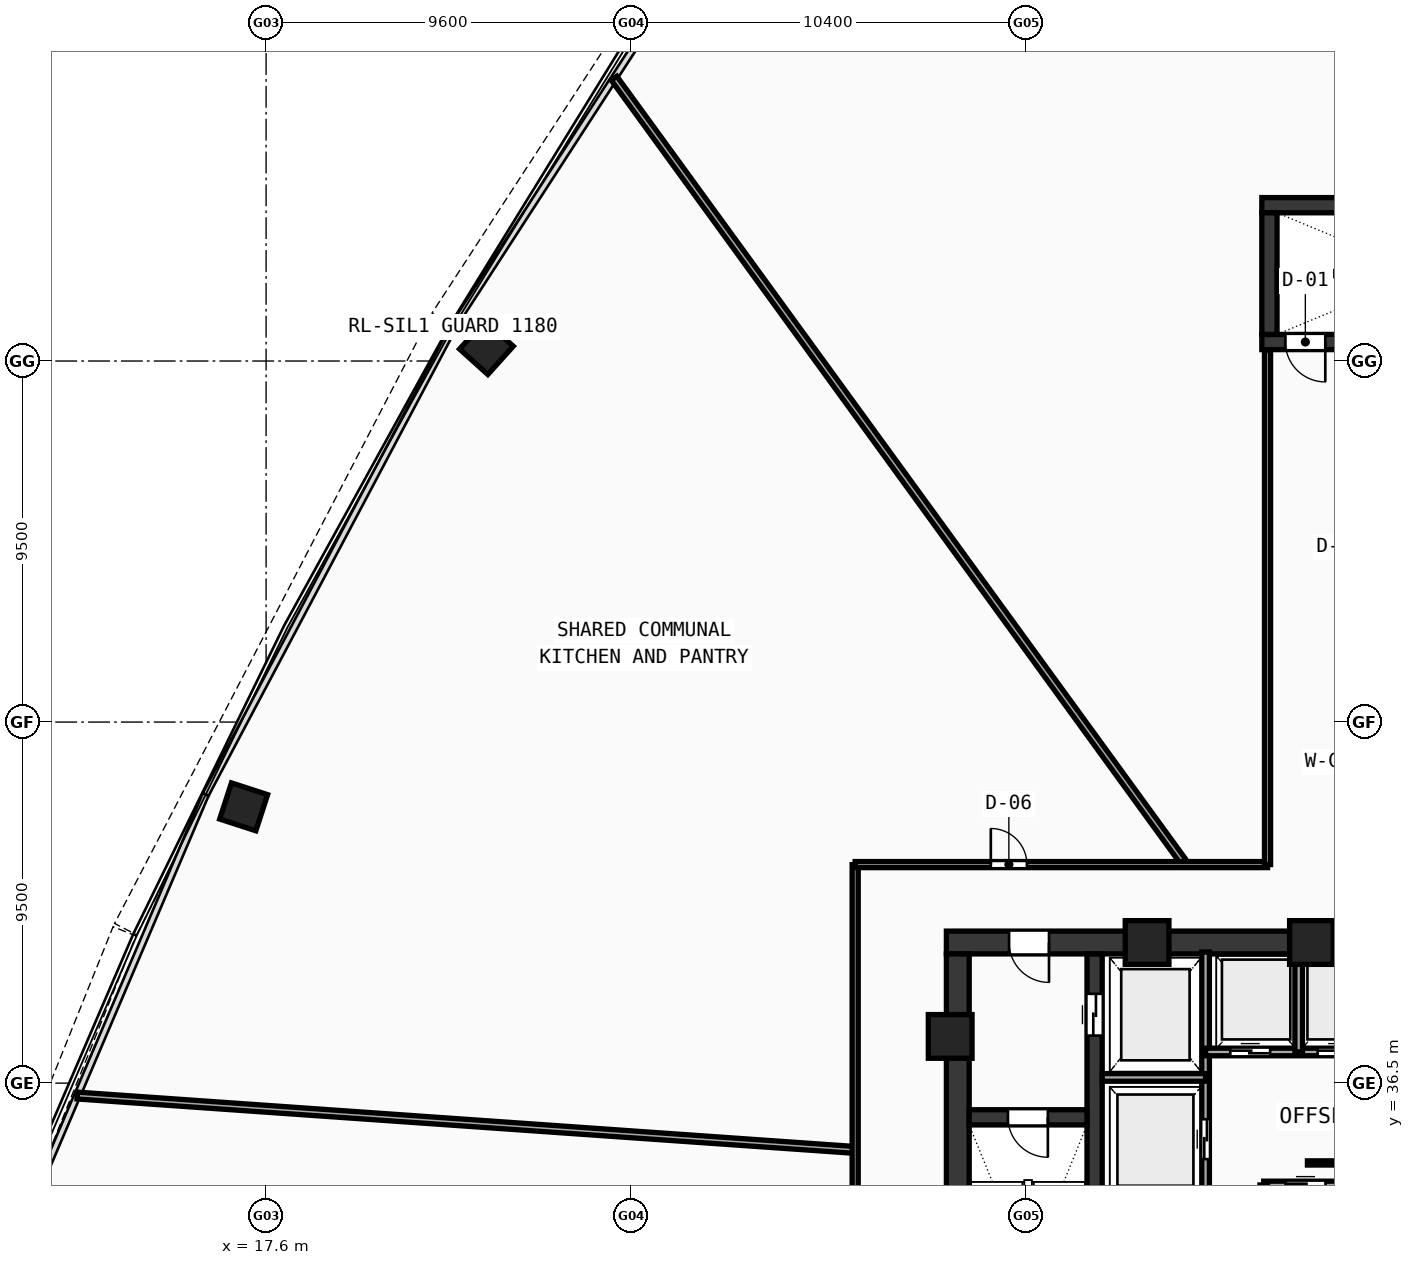
"""IFC4 building model, lengths in metres.
Left out: names, types, materials, properties, quantities, classifications, styles, units other than length and angle.
Written with IfcOpenShell. Run it as: python <this file> out.ifc"""

import sys

from ifc_helpers import new_model, si_unit, direction, frame, frame_2d, origin, origin_with_axes, origin_2d, place, context, subcontext, project, spatial, rectangle, hollow_rectangle, extrude, source, transform, mapped, element, fill, save


model = new_model("IFC4")
c1 = context("Model", 3, precision=1e-05, world=origin(), true_north=direction((0.0, 1.0)))
c2 = subcontext(c1, "Body", "Model", "MODEL_VIEW")
j1 = project(units=[si_unit("LENGTHUNIT", "METRE"), si_unit("PLANEANGLEUNIT", "RADIAN")], contexts=[c1])
p1 = place(None, origin())
s1 = spatial("IfcSite", under=j1, at=p1, CompositionType="ELEMENT")
p2 = place(p1, origin())
s2 = spatial("IfcBuilding", under=s1, at=p2, CompositionType="ELEMENT")
p3 = place(p2, frame((0.0, 0.0, 119.18)))
s3 = spatial("IfcBuildingStorey", under=s2, at=p3, CompositionType="ELEMENT", Elevation=119.18)
p4 = place(p3, frame((35.5, 40.2, 0.0), z_axis=(0.0, 0.0, 1.0), x_axis=(1.0, 0.0, 0.0)))
e1 = element("IfcWall", 1, at=p4, inside=s3, PredefinedType="SHEAR", context=c2, shape_type="SweptSolid", body=[
    extrude(rectangle(XDim=11.3, YDim=0.6, at=frame_2d((5.65, 0.0))), origin(), (0.0, 0.0, 1.0), 5.57),
])
p5 = place(p4, frame((1.65, 0.0, 0.0)))
e2 = element("IfcOpeningElement", 2, at=p5, cuts=e1, PredefinedType="OPENING", context=c2, shape_type="SweptSolid", body=[
    extrude(rectangle(XDim=1.05, YDim=2.1, at=frame_2d((0.525, 1.05))), frame((0.0, 0.31, 0.0), z_axis=(0.0, -1.0, 0.0), x_axis=(1.0, 0.0, 0.0)), (0.0, 0.0, 1.0), 0.62),
])
p6 = place(p3, frame((35.8, 27.8, 0.0), z_axis=(0.0, 0.0, 1.0), x_axis=(0.0, 1.0, 0.0)))
e3 = element("IfcWall", 3, at=p6, inside=s3, PredefinedType="SHEAR", context=c2, shape_type="SweptSolid", body=[
    extrude(rectangle(XDim=12.1, YDim=0.6, at=frame_2d((6.05, 0.0))), origin(), (0.0, 0.0, 1.0), 5.57),
])
p7 = place(p3, frame((39.4, 27.8, 0.0), z_axis=(0.0, 0.0, 1.0), x_axis=(0.0, 1.0, 0.0)))
e4 = element("IfcWall", 4, at=p7, inside=s3, PredefinedType="SHEAR", context=c2, shape_type="SweptSolid", body=[
    extrude(rectangle(XDim=12.1, YDim=0.4, at=frame_2d((6.05, 0.0))), origin(), (0.0, 0.0, 1.0), 5.57),
])
p8 = place(p7, frame((9.95, 0.0, 0.0)))
e5 = element("IfcOpeningElement", 5, at=p8, cuts=e4, PredefinedType="OPENING", context=c2, shape_type="SweptSolid", body=[
    extrude(rectangle(XDim=1.1, YDim=2.1, at=frame_2d((0.55, 1.05))), frame((0.0, 0.21, 0.0), z_axis=(0.0, -1.0, 0.0), x_axis=(1.0, 0.0, 0.0)), (0.0, 0.0, 1.0), 0.42),
])
p9 = place(p3, frame((36.1, 35.6, 0.0), z_axis=(0.0, 0.0, 1.0), x_axis=(1.0, 0.0, 0.0)))
e6 = element("IfcWall", 6, at=p9, inside=s3, PredefinedType="SHEAR", context=c2, shape_type="SweptSolid", body=[
    extrude(rectangle(XDim=3.1, YDim=0.4, at=frame_2d((1.55, 0.0))), origin(), (0.0, 0.0, 1.0), 5.57),
])
p10 = place(p9, frame((1.02, 0.0, 0.0)))
e7 = element("IfcOpeningElement", 7, at=p10, cuts=e6, PredefinedType="OPENING", context=c2, shape_type="SweptSolid", body=[
    extrude(rectangle(XDim=1.05, YDim=2.1, at=frame_2d((0.525, 1.05))), frame((0.0, 0.21, 0.0), z_axis=(0.0, -1.0, 0.0), x_axis=(1.0, 0.0, 0.0)), (0.0, 0.0, 1.0), 0.42),
])
p11 = place(p3, frame((43.8, 59.6, 0.0), z_axis=(0.0, 0.0, 1.0), x_axis=(1.0, 0.0, 0.0)))
e8 = element("IfcWall", 8, at=p11, inside=s3, PredefinedType="SHEAR", context=c2, shape_type="SweptSolid", body=[
    extrude(rectangle(XDim=8.5, YDim=0.4, at=frame_2d((4.25, 0.0))), origin(), (0.0, 0.0, 1.0), 5.57),
])
p12 = place(p3, frame((43.8, 56.0, 0.0), z_axis=(0.0, 0.0, 1.0), x_axis=(1.0, 0.0, 0.0)))
e9 = element("IfcWall", 9, at=p12, inside=s3, PredefinedType="SHEAR", context=c2, shape_type="SweptSolid", body=[
    extrude(rectangle(XDim=8.5, YDim=0.4, at=frame_2d((4.25, 0.0))), origin(), (0.0, 0.0, 1.0), 5.57),
])
p13 = place(p12, frame((0.62, 0.0, 0.0)))
e10 = element("IfcOpeningElement", 10, at=p13, cuts=e9, PredefinedType="OPENING", context=c2, shape_type="SweptSolid", body=[
    extrude(rectangle(XDim=1.05, YDim=2.1, at=frame_2d((0.525, 1.05))), frame((0.0, 0.21, 0.0), z_axis=(0.0, -1.0, 0.0), x_axis=(1.0, 0.0, 0.0)), (0.0, 0.0, 1.0), 0.42),
])
p14 = place(p3, frame((44.0, 56.2, 0.0), z_axis=(0.0, 0.0, 1.0), x_axis=(0.0, 1.0, 0.0)))
e11 = element("IfcWall", 11, at=p14, inside=s3, PredefinedType="SHEAR", context=c2, shape_type="SweptSolid", body=[
    extrude(rectangle(XDim=3.2, YDim=0.4, at=frame_2d((1.6, 0.0))), origin(), (0.0, 0.0, 1.0), 5.57),
])
m1 = source(origin(), c2, "Body", "SweptSolid", [
    extrude(hollow_rectangle(XDim=1.15, YDim=1.15, WallThickness=0.048, at=origin_2d()), origin(), (0.0, 0.0, 1.0), 5.85),
])
for number, where, z_axis, x_axis in (
    (12, (45.106, 40.2, -0.28), (0.0, 0.0, 1.0), (1.0, 0.0, 0.0)),
    (13, (40.781, 40.2, -0.28), (0.0, 0.0, 1.0), (1.0, 0.0, 0.0)),
    (14, (35.6, 37.729, -0.28), (0.0, 0.0, 1.0), (1.0, 0.0, 0.0)),
):
    element("IfcColumn", number, at=place(p3, frame(where, z_axis=z_axis, x_axis=x_axis)), inside=s3, PredefinedType="COLUMN", context=c2, shape_type="MappedRepresentation", body=[
        mapped(m1, transform((0.0, 0.0, 0.0), scale=1.0)),
    ])
m2 = source(origin(), c2, "Body", "SweptSolid", [
    extrude(hollow_rectangle(XDim=1.0, YDim=1.0, WallThickness=0.042, at=origin_2d()), origin(), (0.0, 0.0, 1.0), 5.85),
])
for number, where, z_axis, x_axis in (
    (15, (23.397, 55.852, -0.28), (0.0, 0.0, 1.0), (-0.669, -0.743, 0.0)),
    (16, (17.009, 43.77, -0.28), (0.0, 0.0, 1.0), (-0.309, -0.951, 0.0)),
):
    element("IfcColumn", number, at=place(p3, frame(where, z_axis=z_axis, x_axis=x_axis)), inside=s3, PredefinedType="COLUMN", context=c2, shape_type="MappedRepresentation", body=[
        mapped(m2, transform((0.0, 0.0, 0.0), scale=1.0)),
    ])
p15 = place(p3, frame((42.32, 33.5, 0.0), z_axis=(0.0, 0.0, 1.0), x_axis=(0.0, 1.0, 0.0)))
e17 = element("IfcWall", 17, at=p15, inside=s3, PredefinedType="SOLIDWALL", context=c2, shape_type="SweptSolid", body=[
    extrude(rectangle(XDim=6.45, YDim=0.2, at=frame_2d((3.225, 0.0))), origin(), (0.0, 0.0, 1.0), 5.57),
])
p16 = place(p15, frame((1.0, 0.0, 0.0)))
e18 = element("IfcOpeningElement", 18, at=p16, cuts=e17, PredefinedType="OPENING", context=c2, shape_type="SweptSolid", body=[
    extrude(rectangle(XDim=1.05, YDim=2.1, at=frame_2d((0.525, 1.05))), frame((0.0, 0.11, 0.0), z_axis=(0.0, -1.0, 0.0), x_axis=(1.0, 0.0, 0.0)), (0.0, 0.0, 1.0), 0.22),
])
p17 = place(p3, frame((39.6, 36.65, 0.0), z_axis=(0.0, 0.0, 1.0), x_axis=(1.0, 0.0, 0.0)))
e19 = element("IfcWall", 19, at=p17, inside=s3, PredefinedType="SOLIDWALL", context=c2, shape_type="SweptSolid", body=[
    extrude(rectangle(XDim=2.72, YDim=0.2, at=frame_2d((1.36, 0.0))), origin(), (0.0, 0.0, 1.0), 5.57),
])
p18 = place(p3, frame((42.32, 37.32, 0.0), z_axis=(0.0, 0.0, 1.0), x_axis=(1.0, 0.0, 0.0)))
e20 = element("IfcWall", 20, at=p18, inside=s3, PredefinedType="SOLIDWALL", context=c2, shape_type="SweptSolid", body=[
    extrude(rectangle(XDim=4.73, YDim=0.2, at=frame_2d((2.365, 0.0))), origin(), (0.0, 0.0, 1.0), 5.57),
])
p19 = place(p18, frame((0.65, 0.0, 0.0)))
e21 = element("IfcOpeningElement", 21, at=p19, cuts=e20, PredefinedType="OPENING", context=c2, shape_type="SweptSolid", body=[
    extrude(rectangle(XDim=1.05, YDim=2.1, at=frame_2d((0.525, 1.05))), frame((0.0, 0.11, 0.0), z_axis=(0.0, -1.0, 0.0), x_axis=(1.0, 0.0, 0.0)), (0.0, 0.0, 1.0), 0.22),
])
p20 = place(p18, frame((2.95, 0.0, 0.0)))
e22 = element("IfcOpeningElement", 22, at=p20, cuts=e20, PredefinedType="OPENING", context=c2, shape_type="SweptSolid", body=[
    extrude(rectangle(XDim=1.05, YDim=2.1, at=frame_2d((0.525, 1.05))), frame((0.0, 0.11, 0.0), z_axis=(0.0, -1.0, 0.0), x_axis=(1.0, 0.0, 0.0)), (0.0, 0.0, 1.0), 0.22),
])
p21 = place(p3, frame((44.77, 37.32, 0.0), z_axis=(0.0, 0.0, 1.0), x_axis=(0.0, 1.0, 0.0)))
e23 = element("IfcWall", 23, at=p21, inside=s3, PredefinedType="SOLIDWALL", context=c2, shape_type="SweptSolid", body=[
    extrude(rectangle(XDim=2.63, YDim=0.2, at=frame_2d((1.315, 0.0))), origin(), (0.0, 0.0, 1.0), 2.22),
])
p22 = place(p3, frame((43.85, 33.82, 0.0), z_axis=(0.0, 0.0, 1.0), x_axis=(1.0, 0.0, 0.0)))
e24 = element("IfcWall", 24, at=p22, inside=s3, PredefinedType="SOLIDWALL", context=c2, shape_type="SweptSolid", body=[
    extrude(rectangle(XDim=9.83, YDim=0.2, at=frame_2d((4.915, 0.0))), origin(), (0.0, 0.0, 1.0), 5.57),
])
p23 = place(p22, frame((0.575, 0.0, 0.0)))
e25 = element("IfcOpeningElement", 25, at=p23, cuts=e24, PredefinedType="OPENING", context=c2, shape_type="SweptSolid", body=[
    extrude(rectangle(XDim=1.05, YDim=2.1, at=frame_2d((0.525, 1.05))), frame((0.0, 0.11, 0.0), z_axis=(0.0, -1.0, 0.0), x_axis=(1.0, 0.0, 0.0)), (0.0, 0.0, 1.0), 0.22),
])
p24 = place(p22, frame((2.875, 0.0, 0.0)))
e26 = element("IfcOpeningElement", 26, at=p24, cuts=e24, PredefinedType="OPENING", context=c2, shape_type="SweptSolid", body=[
    extrude(rectangle(XDim=1.05, YDim=2.1, at=frame_2d((0.525, 1.05))), frame((0.0, 0.11, 0.0), z_axis=(0.0, -1.0, 0.0), x_axis=(1.0, 0.0, 0.0)), (0.0, 0.0, 1.0), 0.22),
])
p25 = place(p22, frame((5.175, 0.0, 0.0)))
e27 = element("IfcOpeningElement", 27, at=p25, cuts=e24, PredefinedType="OPENING", context=c2, shape_type="SweptSolid", body=[
    extrude(rectangle(XDim=1.05, YDim=2.1, at=frame_2d((0.525, 1.05))), frame((0.0, 0.11, 0.0), z_axis=(0.0, -1.0, 0.0), x_axis=(1.0, 0.0, 0.0)), (0.0, 0.0, 1.0), 0.22),
])
p26 = place(p22, frame((7.475, 0.0, 0.0)))
e28 = element("IfcOpeningElement", 28, at=p26, cuts=e24, PredefinedType="OPENING", context=c2, shape_type="SweptSolid", body=[
    extrude(rectangle(XDim=1.05, YDim=2.1, at=frame_2d((0.525, 1.05))), frame((0.0, 0.11, 0.0), z_axis=(0.0, -1.0, 0.0), x_axis=(1.0, 0.0, 0.0)), (0.0, 0.0, 1.0), 0.22),
])
p27 = place(p3, frame((43.85, 27.6, 0.0), z_axis=(0.0, 0.0, 1.0), x_axis=(0.0, 1.0, 0.0)))
e29 = element("IfcWall", 29, at=p27, inside=s3, PredefinedType="SOLIDWALL", context=c2, shape_type="SweptSolid", body=[
    extrude(rectangle(XDim=6.22, YDim=0.2, at=frame_2d((3.11, 0.0))), origin(), (0.0, 0.0, 1.0), 5.57),
])
p28 = place(p27, frame((2.25, 0.0, 0.0)))
e30 = element("IfcOpeningElement", 30, at=p28, cuts=e29, PredefinedType="OPENING", context=c2, shape_type="SweptSolid", body=[
    extrude(rectangle(XDim=1.05, YDim=2.1, at=frame_2d((0.525, 1.05))), frame((0.0, 0.11, 0.0), z_axis=(0.0, -1.0, 0.0), x_axis=(1.0, 0.0, 0.0)), (0.0, 0.0, 1.0), 0.22),
])
p29 = place(p3, frame((41.788, 42.25, 0.0), z_axis=(0.0, 0.0, 1.0), x_axis=(-0.587780549385, 0.809020411216, 0.0)))
e31 = element("IfcWall", 31, at=p29, inside=s3, PredefinedType="PARTITIONING", context=c2, shape_type="SweptSolid", body=[
    extrude(rectangle(XDim=25.575, YDim=0.18, at=frame_2d((12.788, 0.0))), origin(), (0.0, 0.0, 1.0), 4.87),
])
p30 = place(p3, frame((33.1, 34.742, 0.0), z_axis=(0.0, 0.0, 1.0), x_axis=(-0.99756459993, 0.069748612653, 0.0)))
e32 = element("IfcWall", 32, at=p30, inside=s3, PredefinedType="PARTITIONING", context=c2, shape_type="SweptSolid", body=[
    extrude(rectangle(XDim=20.519, YDim=0.18, at=frame_2d((10.259, 0.0))), origin(), (0.0, 0.0, 1.0), 4.87),
])
p31 = place(p3, frame((33.1, 24.9, 0.0), z_axis=(0.0, 0.0, 1.0), x_axis=(0.0, 1.0, 0.0)))
e33 = element("IfcWall", 33, at=p31, inside=s3, PredefinedType="PARTITIONING", context=c2, shape_type="SweptSolid", body=[
    extrude(rectangle(XDim=17.35, YDim=0.16, at=frame_2d((8.675, 0.0))), origin(), (0.0, 0.0, 1.0), 2.22),
])
p32 = place(p3, frame((33.1, 42.25, 0.0), z_axis=(0.0, 0.0, 1.0), x_axis=(1.0, 0.0, 0.0)))
e34 = element("IfcWall", 34, at=p32, inside=s3, PredefinedType="PARTITIONING", context=c2, shape_type="SweptSolid", body=[
    extrude(rectangle(XDim=10.85, YDim=0.16, at=frame_2d((5.425, 0.0))), origin(), (0.0, 0.0, 1.0), 2.22),
])
p33 = place(p32, frame((3.569, 0.0, 0.0)))
e35 = element("IfcOpeningElement", 35, at=p33, cuts=e34, PredefinedType="OPENING", context=c2, shape_type="SweptSolid", body=[
    extrude(rectangle(XDim=0.95, YDim=2.1, at=frame_2d((0.475, 1.05))), frame((0.0, 0.09, 0.0), z_axis=(0.0, -1.0, 0.0), x_axis=(1.0, 0.0, 0.0)), (0.0, 0.0, 1.0), 0.18),
])
p34 = place(p3, frame((43.95, 42.25, 0.0), z_axis=(0.0, 0.0, 1.0), x_axis=(0.0, 1.0, 0.0)))
e36 = element("IfcWall", 36, at=p34, inside=s3, PredefinedType="PARTITIONING", context=c2, shape_type="SweptSolid", body=[
    extrude(rectangle(XDim=13.53, YDim=0.16, at=frame_2d((6.765, 0.0))), origin(), (0.0, 0.0, 1.0), 2.22),
])
p35 = place(p3, frame((45.0, 34.4, 0.0), z_axis=(0.0, 0.0, 1.0), x_axis=(1.0, 0.0, 0.0)))
e37 = element("IfcWall", 37, at=p35, inside=s3, PredefinedType="MOVABLE", context=c2, shape_type="SweptSolid", body=[
    extrude(rectangle(XDim=6.0, YDim=0.11, at=frame_2d((3.0, 0.0))), origin(), (0.0, 0.0, 1.0), 2.5),
])
m3 = source(origin(), c2, "Body", "SweptSolid", [
    extrude(rectangle(XDim=1.05, YDim=2.1, at=frame_2d((0.525, 1.05))), frame((0.0, 0.025, 0.0), z_axis=(0.0, -1.0, 0.0), x_axis=(1.0, 0.0, 0.0)), (0.0, 0.0, 1.0), 0.05),
])
p36 = place(p10, frame((1.05, 0.0, 0.0), z_axis=(0.0, 0.0, 1.0), x_axis=(-1.0, 0.0, 0.0)))
e38 = element("IfcDoor", 38, at=p36, inside=s3, OperationType="SINGLE_SWING_LEFT", PredefinedType="DOOR", context=c2, shape_type="MappedRepresentation", body=[
    mapped(m3, transform((0.0, 0.0, 0.0), scale=1.0)),
])
fill(e7, e38)
p37 = place(p5, frame((1.05, 0.0, 0.0), z_axis=(0.0, 0.0, 1.0), x_axis=(-1.0, 0.0, 0.0)))
e39 = element("IfcDoor", 39, at=p37, inside=s3, OperationType="SINGLE_SWING_LEFT", PredefinedType="DOOR", context=c2, shape_type="MappedRepresentation", body=[
    mapped(m3, transform((0.0, 0.0, 0.0), scale=1.0)),
])
fill(e2, e39)
m4 = source(origin(), c2, "Body", "SweptSolid", [
    extrude(rectangle(XDim=1.1, YDim=2.1, at=frame_2d((0.55, 1.05))), frame((0.0, 0.025, 0.0), z_axis=(0.0, -1.0, 0.0), x_axis=(1.0, 0.0, 0.0)), (0.0, 0.0, 1.0), 0.05),
])
p38 = place(p8, frame((1.1, 0.0, 0.0), z_axis=(0.0, 0.0, 1.0), x_axis=(-1.0, 0.0, 0.0)))
e40 = element("IfcDoor", 40, at=p38, inside=s3, OperationType="DOUBLE_DOOR_SLIDING", PredefinedType="DOOR", context=c2, shape_type="MappedRepresentation", body=[
    mapped(m4, transform((0.0, 0.0, 0.0), scale=1.0)),
])
fill(e5, e40)
p39 = place(p16, origin_with_axes())
e41 = element("IfcDoor", 41, at=p39, inside=s3, OperationType="DOUBLE_DOOR_SLIDING", PredefinedType="DOOR", context=c2, shape_type="MappedRepresentation", body=[
    mapped(m3, transform((0.0, 0.0, 0.0), scale=1.0)),
])
fill(e18, e41)
p40 = place(p19, frame((1.05, 0.0, 0.0), z_axis=(0.0, 0.0, 1.0), x_axis=(-1.0, 0.0, 0.0)))
e42 = element("IfcDoor", 42, at=p40, inside=s3, OperationType="DOUBLE_DOOR_SLIDING", PredefinedType="DOOR", context=c2, shape_type="MappedRepresentation", body=[
    mapped(m3, transform((0.0, 0.0, 0.0), scale=1.0)),
])
fill(e21, e42)
p41 = place(p20, frame((1.05, 0.0, 0.0), z_axis=(0.0, 0.0, 1.0), x_axis=(-1.0, 0.0, 0.0)))
e43 = element("IfcDoor", 43, at=p41, inside=s3, OperationType="DOUBLE_DOOR_SLIDING", PredefinedType="DOOR", context=c2, shape_type="MappedRepresentation", body=[
    mapped(m3, transform((0.0, 0.0, 0.0), scale=1.0)),
])
fill(e22, e43)
p42 = place(p23, origin_with_axes())
e44 = element("IfcDoor", 44, at=p42, inside=s3, OperationType="DOUBLE_DOOR_SLIDING", PredefinedType="DOOR", context=c2, shape_type="MappedRepresentation", body=[
    mapped(m3, transform((0.0, 0.0, 0.0), scale=1.0)),
])
fill(e25, e44)
p43 = place(p13, frame((1.05, 0.0, 0.0), z_axis=(0.0, 0.0, 1.0), x_axis=(-1.0, 0.0, 0.0)))
e45 = element("IfcDoor", 45, at=p43, inside=s3, OperationType="SINGLE_SWING_LEFT", PredefinedType="DOOR", context=c2, shape_type="MappedRepresentation", body=[
    mapped(m3, transform((0.0, 0.0, 0.0), scale=1.0)),
])
fill(e10, e45)
m5 = source(origin(), c2, "Body", "SweptSolid", [
    extrude(rectangle(XDim=0.95, YDim=2.1, at=frame_2d((0.475, 1.05))), frame((0.0, 0.025, 0.0), z_axis=(0.0, -1.0, 0.0), x_axis=(1.0, 0.0, 0.0)), (0.0, 0.0, 1.0), 0.05),
])
p44 = place(p33, origin_with_axes())
e46 = element("IfcDoor", 46, at=p44, inside=s3, OperationType="SINGLE_SWING_LEFT", PredefinedType="DOOR", context=c2, shape_type="MappedRepresentation", body=[
    mapped(m5, transform((0.0, 0.0, 0.0), scale=1.0)),
])
fill(e35, e46)
save(model, sys.argv[1])
